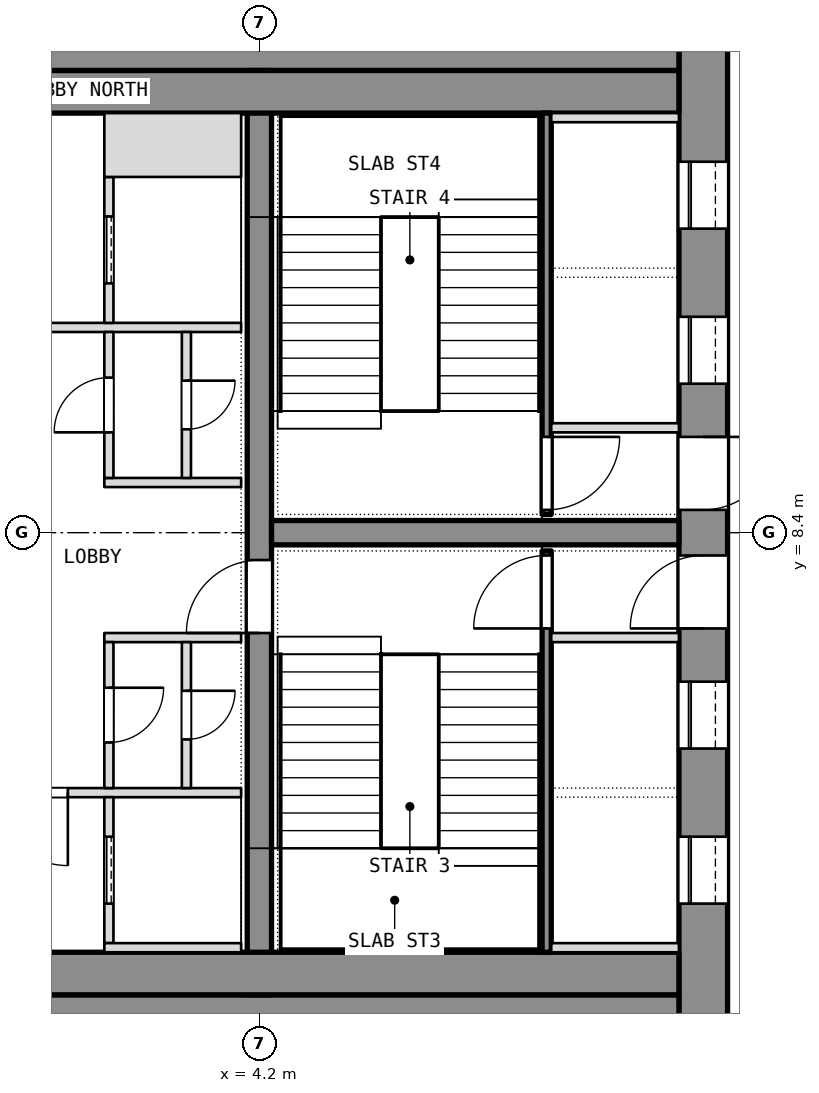
"""IFC4 building model, lengths in metres.
Left out: names, types, materials, properties, quantities, classifications, styles, units other than length and angle.
Written with IfcOpenShell. Run it as: python <this file> out.ifc"""

import sys

from ifc_helpers import new_model, si_unit, direction, frame, frame_2d, origin, place, context, subcontext, project, spatial, rectangle, extrude, element, fill, save


model = new_model("IFC4")
c1 = context("Model", 3, precision=1e-05, world=origin(), true_north=direction((0.0, 1.0)))
c2 = subcontext(c1, "Body", "Model", "MODEL_VIEW")
j1 = project(units=[si_unit("LENGTHUNIT", "METRE"), si_unit("PLANEANGLEUNIT", "RADIAN")], contexts=[c1])
p1 = place(None, origin())
s1 = spatial("IfcSite", under=j1, at=p1, CompositionType="ELEMENT")
p2 = place(p1, origin())
s2 = spatial("IfcBuilding", under=s1, at=p2, CompositionType="ELEMENT")
p3 = place(p2, frame((0.0, 0.0, 234.5)))
s3 = spatial("IfcBuildingStorey", under=s2, at=p3, CompositionType="ELEMENT", Elevation=234.5)
p4 = place(p3, frame((11.5, 0.0, 0.0), z_axis=(0.0, 0.0, 1.0), x_axis=(0.0, 1.0, 0.0)))
e1 = element("IfcWall", 1, at=p4, inside=s3, PredefinedType="SHEAR", context=c2, shape_type="SweptSolid", body=[
    extrude(rectangle(XDim=16.8, YDim=0.8, at=frame_2d((8.4, 0.0))), origin(), (0.0, 0.0, 1.0), 3.6),
])
p5 = place(p4, frame((2.3, 0.0, 0.0)))
e2 = element("IfcOpeningElement", 2, at=p5, cuts=e1, PredefinedType="OPENING", context=c2, shape_type="SweptSolid", body=[
    extrude(rectangle(XDim=1.1, YDim=2.1, at=frame_2d((0.55, 1.05))), frame((0.0, 0.4, 0.0), z_axis=(0.0, -1.0, 0.0), x_axis=(1.0, 0.0, 0.0)), (0.0, 0.0, 1.0), 0.8),
])
p6 = place(p4, frame((4.85, 0.0, 0.0)))
e3 = element("IfcOpeningElement", 3, at=p6, cuts=e1, PredefinedType="OPENING", context=c2, shape_type="SweptSolid", body=[
    extrude(rectangle(XDim=1.1, YDim=2.1, at=frame_2d((0.55, 1.05))), frame((0.0, 0.4, 0.0), z_axis=(0.0, -1.0, 0.0), x_axis=(1.0, 0.0, 0.0)), (0.0, 0.0, 1.0), 0.8),
])
p7 = place(p4, frame((6.825, 0.0, 0.0)))
e4 = element("IfcOpeningElement", 4, at=p7, cuts=e1, PredefinedType="OPENING", context=c2, shape_type="SweptSolid", body=[
    extrude(rectangle(XDim=1.2, YDim=2.1, at=frame_2d((0.6, 1.05))), frame((0.0, 0.4, 0.0), z_axis=(0.0, -1.0, 0.0), x_axis=(1.0, 0.0, 0.0)), (0.0, 0.0, 1.0), 0.8),
])
p8 = place(p4, frame((13.4, 0.0, 0.0)))
e5 = element("IfcOpeningElement", 5, at=p8, cuts=e1, PredefinedType="OPENING", context=c2, shape_type="SweptSolid", body=[
    extrude(rectangle(XDim=1.1, YDim=2.1, at=frame_2d((0.55, 1.05))), frame((0.0, 0.4, 0.0), z_axis=(0.0, -1.0, 0.0), x_axis=(1.0, 0.0, 0.0)), (0.0, 0.0, 1.0), 0.8),
])
p9 = place(p4, frame((10.85, 0.0, 0.0)))
e6 = element("IfcOpeningElement", 6, at=p9, cuts=e1, PredefinedType="OPENING", context=c2, shape_type="SweptSolid", body=[
    extrude(rectangle(XDim=1.1, YDim=2.1, at=frame_2d((0.55, 1.05))), frame((0.0, 0.4, 0.0), z_axis=(0.0, -1.0, 0.0), x_axis=(1.0, 0.0, 0.0)), (0.0, 0.0, 1.0), 0.8),
])
p10 = place(p4, frame((8.775, 0.0, 0.0)))
e7 = element("IfcOpeningElement", 7, at=p10, cuts=e1, PredefinedType="OPENING", context=c2, shape_type="SweptSolid", body=[
    extrude(rectangle(XDim=1.2, YDim=2.1, at=frame_2d((0.6, 1.05))), frame((0.0, 0.4, 0.0), z_axis=(0.0, -1.0, 0.0), x_axis=(1.0, 0.0, 0.0)), (0.0, 0.0, 1.0), 0.8),
])
for number, where, z_axis, x_axis in (
    (8, (-11.1, 0.4, 0.0), (0.0, 0.0, 1.0), (1.0, 0.0, 0.0)),
    (9, (-11.1, 16.4, 0.0), (0.0, 0.0, 1.0), (1.0, 0.0, 0.0)),
):
    element("IfcWall", number, at=place(p3, frame(where, z_axis=z_axis, x_axis=x_axis)), inside=s3, PredefinedType="SHEAR", context=c2, shape_type="SweptSolid", body=[
        extrude(rectangle(XDim=22.2, YDim=0.8, at=frame_2d((11.1, 0.0))), origin(), (0.0, 0.0, 1.0), 3.6),
    ])
p11 = place(p3, frame((4.2, 0.8, 0.0), z_axis=(0.0, 0.0, 1.0), x_axis=(0.0, 1.0, 0.0)))
e10 = element("IfcWall", 10, at=p11, inside=s3, PredefinedType="SHEAR", context=c2, shape_type="SweptSolid", body=[
    extrude(rectangle(XDim=15.2, YDim=0.4, at=frame_2d((7.6, 0.0))), origin(), (0.0, 0.0, 1.0), 3.6),
])
p12 = place(p11, frame((5.95, 0.0, 0.0)))
e11 = element("IfcOpeningElement", 11, at=p12, cuts=e10, PredefinedType="OPENING", context=c2, shape_type="SweptSolid", body=[
    extrude(rectangle(XDim=1.2, YDim=2.1, at=frame_2d((0.6, 1.05))), frame((0.0, 0.2, 0.0), z_axis=(0.0, -1.0, 0.0), x_axis=(1.0, 0.0, 0.0)), (0.0, 0.0, 1.0), 0.4),
])
p13 = place(p3, frame((4.4, 8.4, 0.0), z_axis=(0.0, 0.0, 1.0), x_axis=(1.0, 0.0, 0.0)))
e12 = element("IfcWall", 12, at=p13, inside=s3, PredefinedType="SHEAR", context=c2, shape_type="SweptSolid", body=[
    extrude(rectangle(XDim=6.7, YDim=0.4, at=frame_2d((3.35, 0.0))), origin(), (0.0, 0.0, 1.0), 3.6),
])
for number, where, z_axis, x_axis in (
    (13, (-11.1, 1.15, 0.0), (0.0, 0.0, 1.0), (1.0, 0.0, 0.0)),
    (14, (-11.1, 15.65, 0.0), (0.0, 0.0, 1.0), (1.0, 0.0, 0.0)),
):
    element("IfcWall", number, at=place(p3, frame(where, z_axis=z_axis, x_axis=x_axis)), inside=s3, PredefinedType="PARTITIONING", context=c2, shape_type="SweptSolid", body=[
        extrude(rectangle(XDim=22.2, YDim=0.7, at=frame_2d((11.1, 0.0))), origin(), (0.0, 0.0, 1.0), 3.34),
    ])
p14 = place(p3, frame((8.925, 1.5, 0.0), z_axis=(0.0, 0.0, 1.0), x_axis=(0.0, 1.0, 0.0)))
e15 = element("IfcWall", 15, at=p14, inside=s3, PredefinedType="SHEAR", context=c2, shape_type="SweptSolid", body=[
    extrude(rectangle(XDim=6.6, YDim=0.15, at=frame_2d((3.3, 0.0))), origin(), (0.0, 0.0, 1.0), 3.34),
])
p15 = place(p14, frame((5.325, 0.0, 0.0)))
e16 = element("IfcOpeningElement", 16, at=p15, cuts=e15, PredefinedType="OPENING", context=c2, shape_type="SweptSolid", body=[
    extrude(rectangle(XDim=1.2, YDim=2.1, at=frame_2d((0.6, 1.05))), frame((0.0, 0.075, 0.0), z_axis=(0.0, -1.0, 0.0), x_axis=(1.0, 0.0, 0.0)), (0.0, 0.0, 1.0), 0.15),
])
for number, where, z_axis, x_axis in (
    (17, (9.0, 6.675, 0.0), (0.0, 0.0, 1.0), (1.0, 0.0, 0.0)),
    (18, (9.0, 1.575, 0.0), (0.0, 0.0, 1.0), (1.0, 0.0, 0.0)),
):
    element("IfcWall", number, at=place(p3, frame(where, z_axis=z_axis, x_axis=x_axis)), inside=s3, PredefinedType="SHEAR", context=c2, shape_type="SweptSolid", body=[
        extrude(rectangle(XDim=2.1, YDim=0.15, at=frame_2d((1.05, 0.0))), origin(), (0.0, 0.0, 1.0), 3.6),
    ])
p16 = place(p3, frame((8.925, 8.7, 0.0), z_axis=(0.0, 0.0, 1.0), x_axis=(0.0, 1.0, 0.0)))
e19 = element("IfcWall", 19, at=p16, inside=s3, PredefinedType="SHEAR", context=c2, shape_type="SweptSolid", body=[
    extrude(rectangle(XDim=6.6, YDim=0.15, at=frame_2d((3.3, 0.0))), origin(), (0.0, 0.0, 1.0), 3.34),
])
p17 = place(p16, frame((0.075, 0.0, 0.0)))
e20 = element("IfcOpeningElement", 20, at=p17, cuts=e19, PredefinedType="OPENING", context=c2, shape_type="SweptSolid", body=[
    extrude(rectangle(XDim=1.2, YDim=2.1, at=frame_2d((0.6, 1.05))), frame((0.0, 0.075, 0.0), z_axis=(0.0, -1.0, 0.0), x_axis=(1.0, 0.0, 0.0)), (0.0, 0.0, 1.0), 0.15),
])
for number, where, z_axis, x_axis in (
    (21, (9.0, 10.125, 0.0), (0.0, 0.0, 1.0), (1.0, 0.0, 0.0)),
    (22, (9.0, 15.225, 0.0), (0.0, 0.0, 1.0), (1.0, 0.0, 0.0)),
):
    element("IfcWall", number, at=place(p3, frame(where, z_axis=z_axis, x_axis=x_axis)), inside=s3, PredefinedType="SHEAR", context=c2, shape_type="SweptSolid", body=[
        extrude(rectangle(XDim=2.1, YDim=0.15, at=frame_2d((1.05, 0.0))), origin(), (0.0, 0.0, 1.0), 3.6),
    ])
p18 = place(p3, frame((-3.9, 4.125, 0.0), z_axis=(0.0, 0.0, 1.0), x_axis=(1.0, 0.0, 0.0)))
e23 = element("IfcWall", 23, at=p18, inside=s3, PredefinedType="PARTITIONING", context=c2, shape_type="SweptSolid", body=[
    extrude(rectangle(XDim=7.8, YDim=0.15, at=frame_2d((3.9, 0.0))), origin(), (0.0, 0.0, 1.0), 3.34),
])
p19 = place(p18, frame((3.75, 0.0, 0.0)))
e24 = element("IfcOpeningElement", 24, at=p19, cuts=e23, PredefinedType="OPENING", context=c2, shape_type="SweptSolid", body=[
    extrude(rectangle(XDim=1.2, YDim=2.1, at=frame_2d((0.6, 1.05))), frame((0.0, 0.075, 0.0), z_axis=(0.0, -1.0, 0.0), x_axis=(1.0, 0.0, 0.0)), (0.0, 0.0, 1.0), 0.15),
])
p20 = place(p3, frame((-3.9, 11.775, 0.0), z_axis=(0.0, 0.0, 1.0), x_axis=(1.0, 0.0, 0.0)))
e25 = element("IfcWall", 25, at=p20, inside=s3, PredefinedType="PARTITIONING", context=c2, shape_type="SweptSolid", body=[
    extrude(rectangle(XDim=7.8, YDim=0.15, at=frame_2d((3.9, 0.0))), origin(), (0.0, 0.0, 1.0), 3.34),
])
p21 = place(p20, frame((3.3, 0.0, 0.0)))
e26 = element("IfcOpeningElement", 26, at=p21, cuts=e25, PredefinedType="OPENING", context=c2, shape_type="SweptSolid", body=[
    extrude(rectangle(XDim=1.2, YDim=2.1, at=frame_2d((0.6, 1.05))), frame((0.0, 0.075, 0.0), z_axis=(0.0, -1.0, 0.0), x_axis=(1.0, 0.0, 0.0)), (0.0, 0.0, 1.0), 0.15),
])
p22 = place(p3, frame((1.725, 1.65, 0.0), z_axis=(0.0, 0.0, 1.0), x_axis=(0.0, 1.0, 0.0)))
e27 = element("IfcWall", 27, at=p22, inside=s3, PredefinedType="SHEAR", context=c2, shape_type="SweptSolid", body=[
    extrude(rectangle(XDim=2.4, YDim=0.15, at=frame_2d((1.2, 0.0))), origin(), (0.0, 0.0, 1.0), 3.6),
])
p23 = place(p22, frame((0.65, 0.0, 0.0)))
e28 = element("IfcOpeningElement", 28, at=p23, cuts=e27, PredefinedType="OPENING", context=c2, shape_type="SweptSolid", body=[
    extrude(rectangle(XDim=1.1, YDim=2.1, at=frame_2d((0.55, 1.05))), frame((0.0, 0.075, 0.0), z_axis=(0.0, -1.0, 0.0), x_axis=(1.0, 0.0, 0.0)), (0.0, 0.0, 1.0), 0.15),
])
p24 = place(p3, frame((1.65, 1.575, 0.0), z_axis=(0.0, 0.0, 1.0), x_axis=(1.0, 0.0, 0.0)))
e29 = element("IfcWall", 29, at=p24, inside=s3, PredefinedType="SHEAR", context=c2, shape_type="SweptSolid", body=[
    extrude(rectangle(XDim=2.25, YDim=0.15, at=frame_2d((1.125, 0.0))), origin(), (0.0, 0.0, 1.0), 3.6),
])
p25 = place(p3, frame((1.725, 11.85, 0.0), z_axis=(0.0, 0.0, 1.0), x_axis=(0.0, 1.0, 0.0)))
e30 = element("IfcWall", 30, at=p25, inside=s3, PredefinedType="SHEAR", context=c2, shape_type="SweptSolid", body=[
    extrude(rectangle(XDim=2.4, YDim=0.15, at=frame_2d((1.2, 0.0))), origin(), (0.0, 0.0, 1.0), 3.6),
])
p26 = place(p25, frame((0.65, 0.0, 0.0)))
e31 = element("IfcOpeningElement", 31, at=p26, cuts=e30, PredefinedType="OPENING", context=c2, shape_type="SweptSolid", body=[
    extrude(rectangle(XDim=1.1, YDim=2.1, at=frame_2d((0.55, 1.05))), frame((0.0, 0.075, 0.0), z_axis=(0.0, -1.0, 0.0), x_axis=(1.0, 0.0, 0.0)), (0.0, 0.0, 1.0), 0.15),
])
p27 = place(p3, frame((1.65, 14.775, 0.0), z_axis=(0.0, 0.0, 1.0), x_axis=(1.0, 0.0, 0.0)))
e32 = element("IfcWall", 32, at=p27, inside=s3, PredefinedType="SHEAR", context=c2, shape_type="SweptSolid", body=[
    extrude(rectangle(XDim=2.25, YDim=1.05, at=frame_2d((1.125, 0.0))), origin(), (0.0, 0.0, 1.0), 3.6),
])
for number, where, z_axis, x_axis in (
    (33, (1.65, 6.675, 0.0), (0.0, 0.0, 1.0), (1.0, 0.0, 0.0)),
    (34, (1.65, 9.225, 0.0), (0.0, 0.0, 1.0), (1.0, 0.0, 0.0)),
):
    element("IfcWall", number, at=place(p3, frame(where, z_axis=z_axis, x_axis=x_axis)), inside=s3, PredefinedType="PARTITIONING", context=c2, shape_type="SweptSolid", body=[
        extrude(rectangle(XDim=2.25, YDim=0.15, at=frame_2d((1.125, 0.0))), origin(), (0.0, 0.0, 1.0), 3.34),
    ])
p28 = place(p3, frame((1.725, 4.2, 0.0), z_axis=(0.0, 0.0, 1.0), x_axis=(0.0, 1.0, 0.0)))
e35 = element("IfcWall", 35, at=p28, inside=s3, PredefinedType="PARTITIONING", context=c2, shape_type="SweptSolid", body=[
    extrude(rectangle(XDim=2.4, YDim=0.15, at=frame_2d((1.2, 0.0))), origin(), (0.0, 0.0, 1.0), 3.34),
])
p29 = place(p28, frame((0.75, 0.0, 0.0)))
e36 = element("IfcOpeningElement", 36, at=p29, cuts=e35, PredefinedType="OPENING", context=c2, shape_type="SweptSolid", body=[
    extrude(rectangle(XDim=0.9, YDim=2.1, at=frame_2d((0.45, 1.05))), frame((0.0, 0.075, 0.0), z_axis=(0.0, -1.0, 0.0), x_axis=(1.0, 0.0, 0.0)), (0.0, 0.0, 1.0), 0.15),
])
p30 = place(p3, frame((1.725, 9.3, 0.0), z_axis=(0.0, 0.0, 1.0), x_axis=(0.0, 1.0, 0.0)))
e37 = element("IfcWall", 37, at=p30, inside=s3, PredefinedType="PARTITIONING", context=c2, shape_type="SweptSolid", body=[
    extrude(rectangle(XDim=2.4, YDim=0.15, at=frame_2d((1.2, 0.0))), origin(), (0.0, 0.0, 1.0), 3.34),
])
p31 = place(p30, frame((0.75, 0.0, 0.0)))
e38 = element("IfcOpeningElement", 38, at=p31, cuts=e37, PredefinedType="OPENING", context=c2, shape_type="SweptSolid", body=[
    extrude(rectangle(XDim=0.9, YDim=2.1, at=frame_2d((0.45, 1.05))), frame((0.0, 0.075, 0.0), z_axis=(0.0, -1.0, 0.0), x_axis=(1.0, 0.0, 0.0)), (0.0, 0.0, 1.0), 0.15),
])
p32 = place(p3, frame((3.0, 4.2, 0.0), z_axis=(0.0, 0.0, 1.0), x_axis=(0.0, 1.0, 0.0)))
e39 = element("IfcWall", 39, at=p32, inside=s3, PredefinedType="PARTITIONING", context=c2, shape_type="SweptSolid", body=[
    extrude(rectangle(XDim=2.4, YDim=0.15, at=frame_2d((1.2, 0.0))), origin(), (0.0, 0.0, 1.0), 3.34),
])
p33 = place(p32, frame((0.8, 0.0, 0.0)))
e40 = element("IfcOpeningElement", 40, at=p33, cuts=e39, PredefinedType="OPENING", context=c2, shape_type="SweptSolid", body=[
    extrude(rectangle(XDim=0.8, YDim=2.1, at=frame_2d((0.4, 1.05))), frame((0.0, 0.075, 0.0), z_axis=(0.0, -1.0, 0.0), x_axis=(1.0, 0.0, 0.0)), (0.0, 0.0, 1.0), 0.15),
])
p34 = place(p3, frame((3.0, 9.3, 0.0), z_axis=(0.0, 0.0, 1.0), x_axis=(0.0, 1.0, 0.0)))
e41 = element("IfcWall", 41, at=p34, inside=s3, PredefinedType="PARTITIONING", context=c2, shape_type="SweptSolid", body=[
    extrude(rectangle(XDim=2.4, YDim=0.15, at=frame_2d((1.2, 0.0))), origin(), (0.0, 0.0, 1.0), 3.34),
])
p35 = place(p34, frame((0.8, 0.0, 0.0)))
e42 = element("IfcOpeningElement", 42, at=p35, cuts=e41, PredefinedType="OPENING", context=c2, shape_type="SweptSolid", body=[
    extrude(rectangle(XDim=0.8, YDim=2.1, at=frame_2d((0.4, 1.05))), frame((0.0, 0.075, 0.0), z_axis=(0.0, -1.0, 0.0), x_axis=(1.0, 0.0, 0.0)), (0.0, 0.0, 1.0), 0.15),
])
p36 = place(p5, origin())
e43 = element("IfcDoor", 43, at=p36, inside=s3, OperationType="SLIDING_TO_LEFT", PredefinedType="DOOR", context=c2, shape_type="SweptSolid", body=[
    extrude(rectangle(XDim=1.1, YDim=2.1, at=frame_2d((0.55, 1.05))), frame((0.0, 0.025, 0.0), z_axis=(0.0, -1.0, 0.0), x_axis=(1.0, 0.0, 0.0)), (0.0, 0.0, 1.0), 0.05),
])
fill(e2, e43)
p37 = place(p6, origin())
e44 = element("IfcDoor", 44, at=p37, inside=s3, OperationType="SLIDING_TO_LEFT", PredefinedType="DOOR", context=c2, shape_type="SweptSolid", body=[
    extrude(rectangle(XDim=1.1, YDim=2.1, at=frame_2d((0.55, 1.05))), frame((0.0, 0.025, 0.0), z_axis=(0.0, -1.0, 0.0), x_axis=(1.0, 0.0, 0.0)), (0.0, 0.0, 1.0), 0.05),
])
fill(e3, e44)
p38 = place(p7, origin())
e45 = element("IfcDoor", 45, at=p38, inside=s3, OperationType="SINGLE_SWING_LEFT", PredefinedType="DOOR", context=c2, shape_type="SweptSolid", body=[
    extrude(rectangle(XDim=1.2, YDim=2.1, at=frame_2d((0.6, 1.05))), frame((0.0, 0.025, 0.0), z_axis=(0.0, -1.0, 0.0), x_axis=(1.0, 0.0, 0.0)), (0.0, 0.0, 1.0), 0.05),
])
fill(e4, e45)
p39 = place(p15, origin())
e46 = element("IfcDoor", 46, at=p39, inside=s3, OperationType="SINGLE_SWING_LEFT", PredefinedType="DOOR", context=c2, shape_type="SweptSolid", body=[
    extrude(rectangle(XDim=1.2, YDim=2.1, at=frame_2d((0.6, 1.05))), frame((0.0, 0.025, 0.0), z_axis=(0.0, -1.0, 0.0), x_axis=(1.0, 0.0, 0.0)), (0.0, 0.0, 1.0), 0.05),
])
fill(e16, e46)
p40 = place(p8, origin())
e47 = element("IfcDoor", 47, at=p40, inside=s3, OperationType="SLIDING_TO_LEFT", PredefinedType="DOOR", context=c2, shape_type="SweptSolid", body=[
    extrude(rectangle(XDim=1.1, YDim=2.1, at=frame_2d((0.55, 1.05))), frame((0.0, 0.025, 0.0), z_axis=(0.0, -1.0, 0.0), x_axis=(1.0, 0.0, 0.0)), (0.0, 0.0, 1.0), 0.05),
])
fill(e5, e47)
p41 = place(p9, origin())
e48 = element("IfcDoor", 48, at=p41, inside=s3, OperationType="SLIDING_TO_LEFT", PredefinedType="DOOR", context=c2, shape_type="SweptSolid", body=[
    extrude(rectangle(XDim=1.1, YDim=2.1, at=frame_2d((0.55, 1.05))), frame((0.0, 0.025, 0.0), z_axis=(0.0, -1.0, 0.0), x_axis=(1.0, 0.0, 0.0)), (0.0, 0.0, 1.0), 0.05),
])
fill(e6, e48)
p42 = place(p10, origin())
e49 = element("IfcDoor", 49, at=p42, inside=s3, OperationType="SINGLE_SWING_LEFT", PredefinedType="DOOR", context=c2, shape_type="SweptSolid", body=[
    extrude(rectangle(XDim=1.2, YDim=2.1, at=frame_2d((0.6, 1.05))), frame((0.0, 0.025, 0.0), z_axis=(0.0, -1.0, 0.0), x_axis=(1.0, 0.0, 0.0)), (0.0, 0.0, 1.0), 0.05),
])
fill(e7, e49)
p43 = place(p17, origin())
e50 = element("IfcDoor", 50, at=p43, inside=s3, OperationType="SINGLE_SWING_LEFT", PredefinedType="DOOR", context=c2, shape_type="SweptSolid", body=[
    extrude(rectangle(XDim=1.2, YDim=2.1, at=frame_2d((0.6, 1.05))), frame((0.0, 0.025, 0.0), z_axis=(0.0, -1.0, 0.0), x_axis=(1.0, 0.0, 0.0)), (0.0, 0.0, 1.0), 0.05),
])
fill(e20, e50)
p44 = place(p29, origin())
e51 = element("IfcDoor", 51, at=p44, inside=s3, OperationType="SINGLE_SWING_LEFT", PredefinedType="DOOR", context=c2, shape_type="SweptSolid", body=[
    extrude(rectangle(XDim=0.9, YDim=2.1, at=frame_2d((0.45, 1.05))), frame((0.0, 0.025, 0.0), z_axis=(0.0, -1.0, 0.0), x_axis=(1.0, 0.0, 0.0)), (0.0, 0.0, 1.0), 0.05),
])
fill(e36, e51)
p45 = place(p33, origin())
e52 = element("IfcDoor", 52, at=p45, inside=s3, OperationType="SINGLE_SWING_LEFT", PredefinedType="DOOR", context=c2, shape_type="SweptSolid", body=[
    extrude(rectangle(XDim=0.8, YDim=2.1, at=frame_2d((0.4, 1.05))), frame((0.0, 0.025, 0.0), z_axis=(0.0, -1.0, 0.0), x_axis=(1.0, 0.0, 0.0)), (0.0, 0.0, 1.0), 0.05),
])
fill(e40, e52)
p46 = place(p31, origin())
e53 = element("IfcDoor", 53, at=p46, inside=s3, OperationType="SINGLE_SWING_LEFT", PredefinedType="DOOR", context=c2, shape_type="SweptSolid", body=[
    extrude(rectangle(XDim=0.9, YDim=2.1, at=frame_2d((0.45, 1.05))), frame((0.0, 0.025, 0.0), z_axis=(0.0, -1.0, 0.0), x_axis=(1.0, 0.0, 0.0)), (0.0, 0.0, 1.0), 0.05),
])
fill(e38, e53)
p47 = place(p35, origin())
e54 = element("IfcDoor", 54, at=p47, inside=s3, OperationType="SINGLE_SWING_LEFT", PredefinedType="DOOR", context=c2, shape_type="SweptSolid", body=[
    extrude(rectangle(XDim=0.8, YDim=2.1, at=frame_2d((0.4, 1.05))), frame((0.0, 0.025, 0.0), z_axis=(0.0, -1.0, 0.0), x_axis=(1.0, 0.0, 0.0)), (0.0, 0.0, 1.0), 0.05),
])
fill(e42, e54)
p48 = place(p23, origin())
e55 = element("IfcDoor", 55, at=p48, inside=s3, OperationType="SLIDING_TO_LEFT", PredefinedType="DOOR", context=c2, shape_type="SweptSolid", body=[
    extrude(rectangle(XDim=1.1, YDim=2.1, at=frame_2d((0.55, 1.05))), frame((0.0, 0.025, 0.0), z_axis=(0.0, -1.0, 0.0), x_axis=(1.0, 0.0, 0.0)), (0.0, 0.0, 1.0), 0.05),
])
fill(e28, e55)
p49 = place(p26, origin())
e56 = element("IfcDoor", 56, at=p49, inside=s3, OperationType="SLIDING_TO_LEFT", PredefinedType="DOOR", context=c2, shape_type="SweptSolid", body=[
    extrude(rectangle(XDim=1.1, YDim=2.1, at=frame_2d((0.55, 1.05))), frame((0.0, 0.025, 0.0), z_axis=(0.0, -1.0, 0.0), x_axis=(1.0, 0.0, 0.0)), (0.0, 0.0, 1.0), 0.05),
])
fill(e31, e56)
p50 = place(p19, origin())
e57 = element("IfcDoor", 57, at=p50, inside=s3, OperationType="SINGLE_SWING_LEFT", PredefinedType="DOOR", context=c2, shape_type="SweptSolid", body=[
    extrude(rectangle(XDim=1.2, YDim=2.1, at=frame_2d((0.6, 1.05))), frame((0.0, 0.025, 0.0), z_axis=(0.0, -1.0, 0.0), x_axis=(1.0, 0.0, 0.0)), (0.0, 0.0, 1.0), 0.05),
])
fill(e24, e57)
p51 = place(p12, origin())
e58 = element("IfcDoor", 58, at=p51, inside=s3, OperationType="SINGLE_SWING_LEFT", PredefinedType="DOOR", context=c2, shape_type="SweptSolid", body=[
    extrude(rectangle(XDim=1.2, YDim=2.1, at=frame_2d((0.6, 1.05))), frame((0.0, 0.025, 0.0), z_axis=(0.0, -1.0, 0.0), x_axis=(1.0, 0.0, 0.0)), (0.0, 0.0, 1.0), 0.05),
])
fill(e11, e58)
save(model, sys.argv[1])
